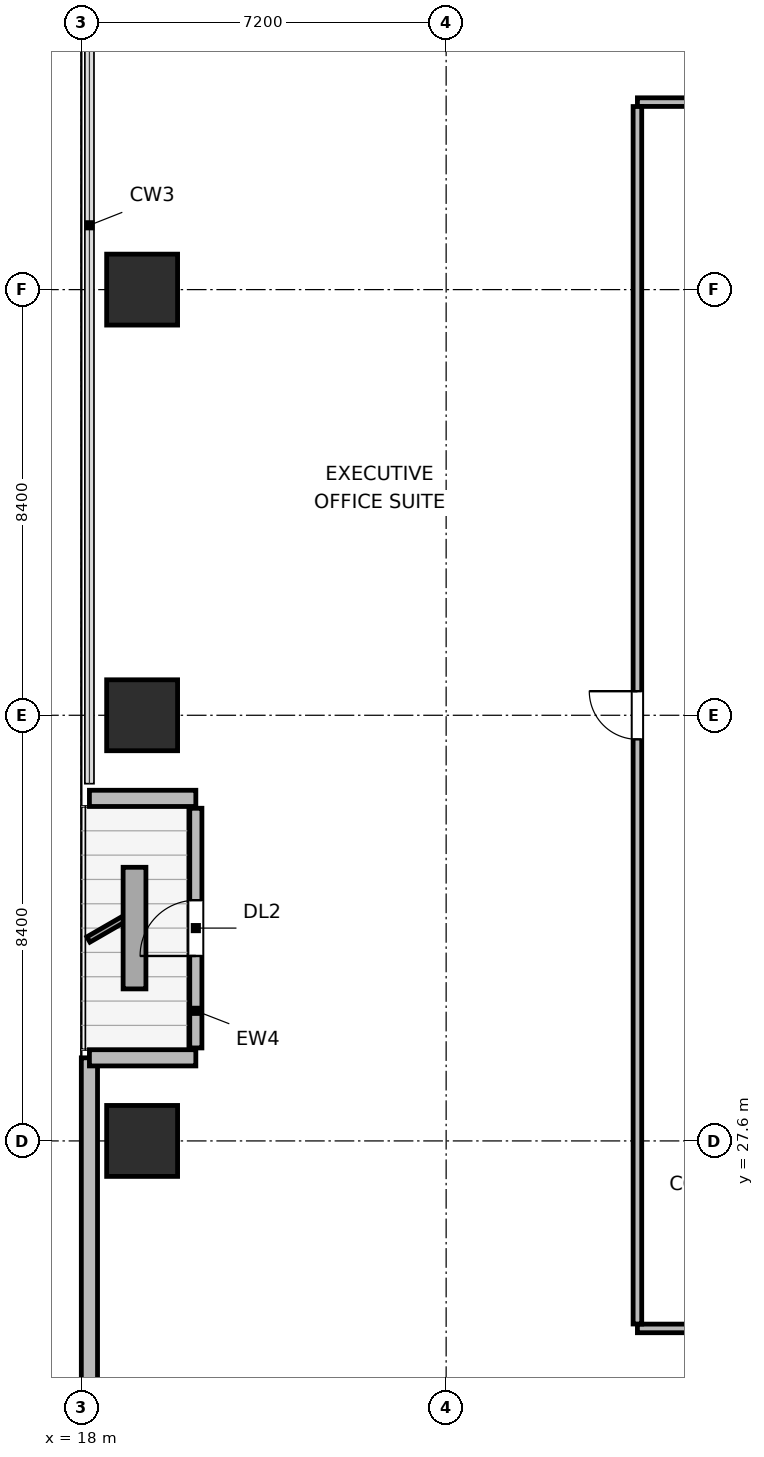
"""IFC4 building model, lengths in metres.
Left out: names, types, materials, properties, quantities, classifications, styles, units other than length and angle.
Written with IfcOpenShell. Run it as: python <this file> out.ifc"""

import sys

from ifc_helpers import new_model, si_unit, direction, frame, frame_2d, origin, origin_2d, place, context, subcontext, project, spatial, rectangle, extrude, element, fill, save


model = new_model("IFC4")
c1 = context("Model", 3, precision=1e-05, world=origin(), true_north=direction((0.0, 1.0)))
c2 = subcontext(c1, "Body", "Model", "MODEL_VIEW")
j1 = project(units=[si_unit("LENGTHUNIT", "METRE"), si_unit("PLANEANGLEUNIT", "RADIAN")], contexts=[c1])
p1 = place(None, origin())
s1 = spatial("IfcSite", under=j1, at=p1, CompositionType="ELEMENT")
p2 = place(p1, origin())
s2 = spatial("IfcBuilding", under=s1, at=p2, CompositionType="ELEMENT")
p3 = place(p2, frame((0.0, 0.0, 97.5)))
s3 = spatial("IfcBuildingStorey", under=s2, at=p3, CompositionType="ELEMENT", Elevation=97.5)
for number, where, z_axis, x_axis in (
    (1, (19.2, 27.6, 0.0), (0.0, 0.0, 1.0), (1.0, 0.0, 0.0)),
    (2, (19.2, 36.0, 0.0), (0.0, 0.0, 1.0), (1.0, 0.0, 0.0)),
    (3, (19.2, 44.4, 0.0), (0.0, 0.0, 1.0), (1.0, 0.0, 0.0)),
):
    element("IfcColumn", number, at=place(p3, frame(where, z_axis=z_axis, x_axis=x_axis)), inside=s3, PredefinedType="COLUMN", context=c2, shape_type="SweptSolid", body=[
        extrude(rectangle(XDim=1.4, YDim=1.4, at=origin_2d()), origin(), (0.0, 0.0, 1.0), 3.9),
    ])
p4 = place(p3, frame((18.16, 15.021, 0.0), z_axis=(0.0, 0.0, 1.0), x_axis=(0.0, 1.0, 0.0)))
e4 = element("IfcWall", 4, at=p4, inside=s3, PredefinedType="SOLIDWALL", context=c2, shape_type="SweptSolid", body=[
    extrude(rectangle(XDim=14.219, YDim=0.32, at=frame_2d((7.109, 0.0))), origin(), (0.0, 0.0, 1.0), 3.64),
])
p5 = place(p3, frame((18.16, 29.24, 0.0), z_axis=(0.0, 0.0, 1.0), x_axis=(1.0, 0.0, 0.0)))
e5 = element("IfcWall", 5, at=p5, inside=s3, PredefinedType="SOLIDWALL", context=c2, shape_type="SweptSolid", body=[
    extrude(rectangle(XDim=2.1, YDim=0.32, at=frame_2d((1.05, 0.0))), origin(), (0.0, 0.0, 1.0), 2.875),
])
p6 = place(p3, frame((20.26, 29.435, 0.0), z_axis=(0.0, 0.0, 1.0), x_axis=(0.0, 1.0, 0.0)))
e6 = element("IfcWall", 6, at=p6, inside=s3, PredefinedType="SOLIDWALL", context=c2, shape_type="SweptSolid", body=[
    extrude(rectangle(XDim=4.73, YDim=0.24, at=frame_2d((2.365, 0.0))), origin(), (0.0, 0.0, 1.0), 3.162),
])
p7 = place(p6, frame((1.815, 0.0, 0.0)))
e7 = element("IfcOpeningElement", 7, at=p7, cuts=e6, PredefinedType="OPENING", context=c2, shape_type="SweptSolid", body=[
    extrude(rectangle(XDim=1.1, YDim=2.04, at=frame_2d((0.55, 1.02))), frame((0.0, 0.13, 0.0), z_axis=(0.0, -1.0, 0.0), x_axis=(1.0, 0.0, 0.0)), (0.0, 0.0, 1.0), 0.26),
])
p8 = place(p3, frame((20.26, 34.36, 0.0), z_axis=(0.0, 0.0, 1.0), x_axis=(-1.0, 0.0, 0.0)))
e8 = element("IfcWall", 8, at=p8, inside=s3, PredefinedType="SOLIDWALL", context=c2, shape_type="SweptSolid", body=[
    extrude(rectangle(XDim=2.1, YDim=0.32, at=frame_2d((1.05, 0.0))), origin(), (0.0, 0.0, 1.0), 2.875),
])
p9 = place(p3, frame((28.975, 23.9, 0.0), z_axis=(0.0, 0.0, 1.0), x_axis=(1.0, 0.0, 0.0)))
e9 = element("IfcWall", 9, at=p9, inside=s3, PredefinedType="PARTITIONING", context=c2, shape_type="SweptSolid", body=[
    extrude(rectangle(XDim=38.05, YDim=0.17, at=frame_2d((19.025, 0.0))), origin(), (0.0, 0.0, 1.0), 3.64),
])
p10 = place(p9, frame((3.097, 0.0, 0.0)))
e10 = element("IfcOpeningElement", 10, at=p10, cuts=e9, PredefinedType="OPENING", context=c2, shape_type="SweptSolid", body=[
    extrude(rectangle(XDim=0.95, YDim=2.04, at=frame_2d((0.475, 1.02))), frame((0.0, 0.095, 0.0), z_axis=(0.0, -1.0, 0.0), x_axis=(1.0, 0.0, 0.0)), (0.0, 0.0, 1.0), 0.19),
])
p11 = place(p9, frame((9.64, 0.0, 0.0)))
e11 = element("IfcOpeningElement", 11, at=p11, cuts=e9, PredefinedType="OPENING", context=c2, shape_type="SweptSolid", body=[
    extrude(rectangle(XDim=0.95, YDim=2.04, at=frame_2d((0.475, 1.02))), frame((0.0, 0.095, 0.0), z_axis=(0.0, -1.0, 0.0), x_axis=(1.0, 0.0, 0.0)), (0.0, 0.0, 1.0), 0.19),
])
p12 = place(p9, frame((15.58, 0.0, 0.0)))
e12 = element("IfcOpeningElement", 12, at=p12, cuts=e9, PredefinedType="OPENING", context=c2, shape_type="SweptSolid", body=[
    extrude(rectangle(XDim=0.95, YDim=2.04, at=frame_2d((0.475, 1.02))), frame((0.0, 0.095, 0.0), z_axis=(0.0, -1.0, 0.0), x_axis=(1.0, 0.0, 0.0)), (0.0, 0.0, 1.0), 0.19),
])
p13 = place(p9, frame((21.52, 0.0, 0.0)))
e13 = element("IfcOpeningElement", 13, at=p13, cuts=e9, PredefinedType="OPENING", context=c2, shape_type="SweptSolid", body=[
    extrude(rectangle(XDim=0.95, YDim=2.04, at=frame_2d((0.475, 1.02))), frame((0.0, 0.095, 0.0), z_axis=(0.0, -1.0, 0.0), x_axis=(1.0, 0.0, 0.0)), (0.0, 0.0, 1.0), 0.19),
])
p14 = place(p9, frame((27.46, 0.0, 0.0)))
e14 = element("IfcOpeningElement", 14, at=p14, cuts=e9, PredefinedType="OPENING", context=c2, shape_type="SweptSolid", body=[
    extrude(rectangle(XDim=0.95, YDim=2.04, at=frame_2d((0.475, 1.02))), frame((0.0, 0.095, 0.0), z_axis=(0.0, -1.0, 0.0), x_axis=(1.0, 0.0, 0.0)), (0.0, 0.0, 1.0), 0.19),
])
p15 = place(p9, frame((34.003, 0.0, 0.0)))
e15 = element("IfcOpeningElement", 15, at=p15, cuts=e9, PredefinedType="OPENING", context=c2, shape_type="SweptSolid", body=[
    extrude(rectangle(XDim=0.95, YDim=2.04, at=frame_2d((0.475, 1.02))), frame((0.0, 0.095, 0.0), z_axis=(0.0, -1.0, 0.0), x_axis=(1.0, 0.0, 0.0)), (0.0, 0.0, 1.0), 0.19),
])
p16 = place(p3, frame((28.975, 48.1, 0.0), z_axis=(0.0, 0.0, 1.0), x_axis=(1.0, 0.0, 0.0)))
e16 = element("IfcWall", 16, at=p16, inside=s3, PredefinedType="PARTITIONING", context=c2, shape_type="SweptSolid", body=[
    extrude(rectangle(XDim=38.05, YDim=0.17, at=frame_2d((19.025, 0.0))), origin(), (0.0, 0.0, 1.0), 3.64),
])
p17 = place(p16, frame((4.923, 0.0, 0.0)))
e17 = element("IfcOpeningElement", 17, at=p17, cuts=e16, PredefinedType="OPENING", context=c2, shape_type="SweptSolid", body=[
    extrude(rectangle(XDim=0.95, YDim=2.04, at=frame_2d((0.475, 1.02))), frame((0.0, 0.095, 0.0), z_axis=(0.0, -1.0, 0.0), x_axis=(1.0, 0.0, 0.0)), (0.0, 0.0, 1.0), 0.19),
])
p18 = place(p16, frame((13.34, 0.0, 0.0)))
e18 = element("IfcOpeningElement", 18, at=p18, cuts=e16, PredefinedType="OPENING", context=c2, shape_type="SweptSolid", body=[
    extrude(rectangle(XDim=0.95, YDim=2.04, at=frame_2d((0.475, 1.02))), frame((0.0, 0.095, 0.0), z_axis=(0.0, -1.0, 0.0), x_axis=(1.0, 0.0, 0.0)), (0.0, 0.0, 1.0), 0.19),
])
p19 = place(p16, frame((20.06, 0.0, 0.0)))
e19 = element("IfcOpeningElement", 19, at=p19, cuts=e16, PredefinedType="OPENING", context=c2, shape_type="SweptSolid", body=[
    extrude(rectangle(XDim=0.95, YDim=2.04, at=frame_2d((0.475, 1.02))), frame((0.0, 0.095, 0.0), z_axis=(0.0, -1.0, 0.0), x_axis=(1.0, 0.0, 0.0)), (0.0, 0.0, 1.0), 0.19),
])
p20 = place(p16, frame((25.27, 0.0, 0.0)))
e20 = element("IfcOpeningElement", 20, at=p20, cuts=e16, PredefinedType="OPENING", context=c2, shape_type="SweptSolid", body=[
    extrude(rectangle(XDim=0.95, YDim=2.04, at=frame_2d((0.475, 1.02))), frame((0.0, 0.095, 0.0), z_axis=(0.0, -1.0, 0.0), x_axis=(1.0, 0.0, 0.0)), (0.0, 0.0, 1.0), 0.19),
])
p21 = place(p16, frame((32.178, 0.0, 0.0)))
e21 = element("IfcOpeningElement", 21, at=p21, cuts=e16, PredefinedType="OPENING", context=c2, shape_type="SweptSolid", body=[
    extrude(rectangle(XDim=0.95, YDim=2.04, at=frame_2d((0.475, 1.02))), frame((0.0, 0.095, 0.0), z_axis=(0.0, -1.0, 0.0), x_axis=(1.0, 0.0, 0.0)), (0.0, 0.0, 1.0), 0.19),
])
p22 = place(p3, frame((28.975, 23.987, 0.0), z_axis=(0.0, 0.0, 1.0), x_axis=(0.0, 1.0, 0.0)))
e22 = element("IfcWall", 22, at=p22, inside=s3, PredefinedType="PARTITIONING", context=c2, shape_type="SweptSolid", body=[
    extrude(rectangle(XDim=24.026, YDim=0.17, at=frame_2d((12.013, 0.0))), origin(), (0.0, 0.0, 1.0), 3.64),
])
p23 = place(p22, frame((11.538, 0.0, 0.0)))
e23 = element("IfcOpeningElement", 23, at=p23, cuts=e22, PredefinedType="OPENING", context=c2, shape_type="SweptSolid", body=[
    extrude(rectangle(XDim=0.95, YDim=2.04, at=frame_2d((0.475, 1.02))), frame((0.0, 0.095, 0.0), z_axis=(0.0, -1.0, 0.0), x_axis=(1.0, 0.0, 0.0)), (0.0, 0.0, 1.0), 0.19),
])
p24 = place(p7, origin())
e24 = element("IfcDoor", 24, at=p24, inside=s3, OperationType="SINGLE_SWING_LEFT", PredefinedType="DOOR", context=c2, shape_type="SweptSolid", body=[
    extrude(rectangle(XDim=1.1, YDim=2.04, at=frame_2d((0.55, 1.02))), frame((0.0, 0.025, 0.0), z_axis=(0.0, -1.0, 0.0), x_axis=(1.0, 0.0, 0.0)), (0.0, 0.0, 1.0), 0.05),
])
fill(e7, e24)
p25 = place(p23, origin())
e25 = element("IfcDoor", 25, at=p25, inside=s3, OperationType="SINGLE_SWING_RIGHT", PredefinedType="DOOR", context=c2, shape_type="SweptSolid", body=[
    extrude(rectangle(XDim=0.95, YDim=2.04, at=frame_2d((0.475, 1.02))), frame((0.0, 0.025, 0.0), z_axis=(0.0, -1.0, 0.0), x_axis=(1.0, 0.0, 0.0)), (0.0, 0.0, 1.0), 0.05),
])
fill(e23, e25)
save(model, sys.argv[1])
